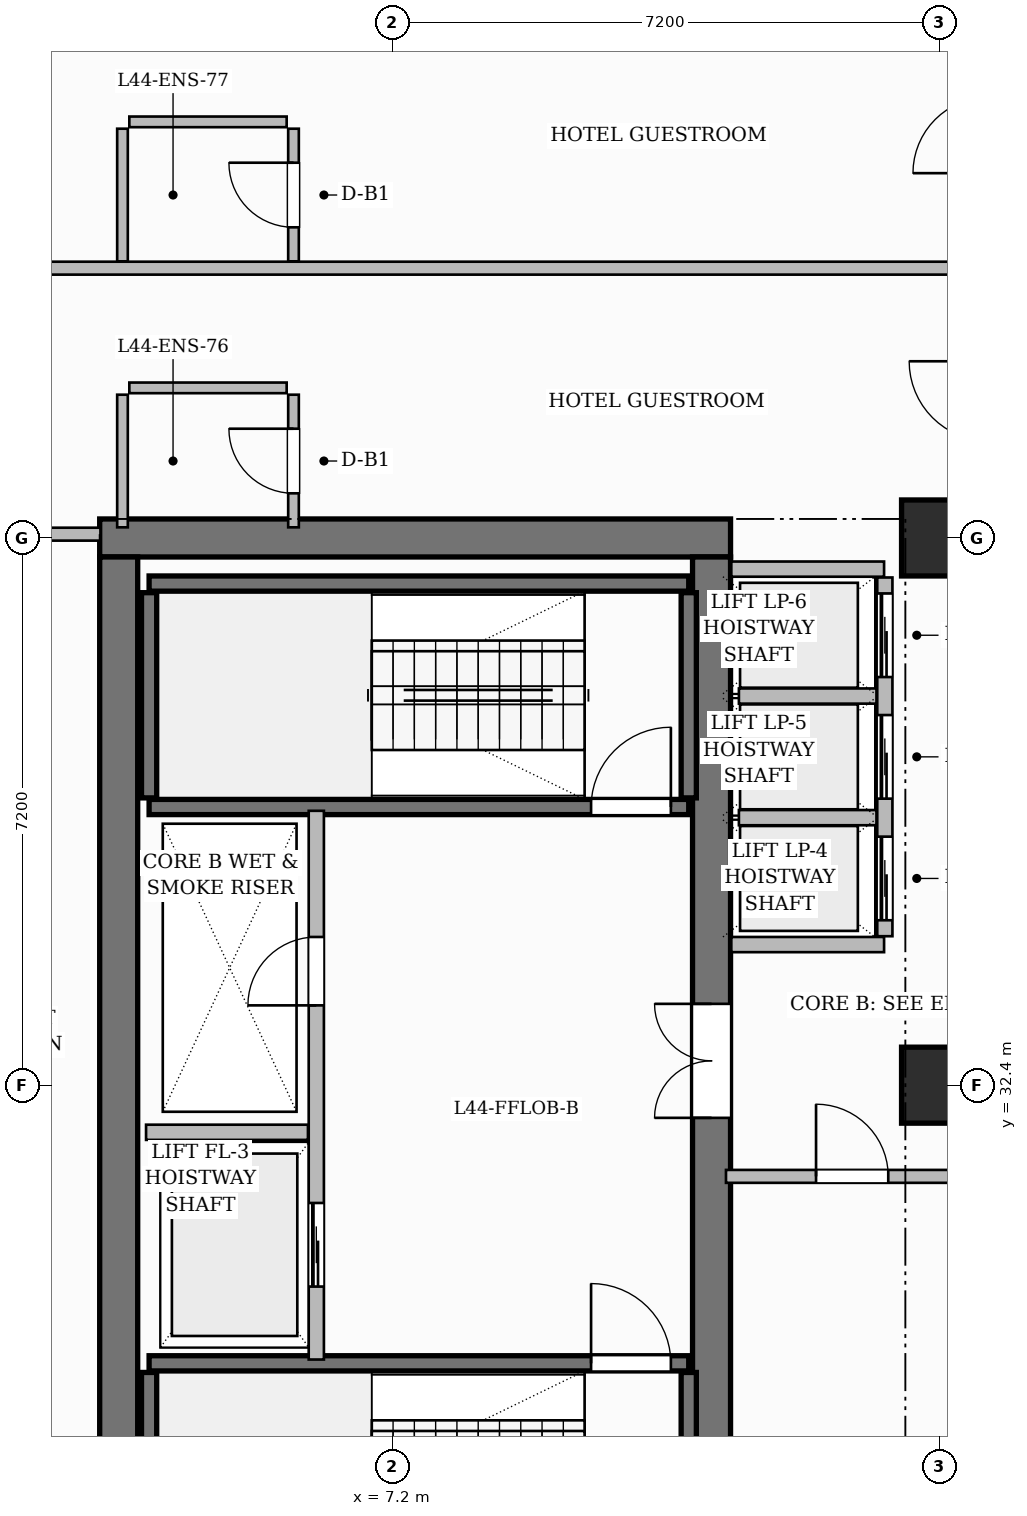
"""IFC4 building model, lengths in metres.
Left out: names, types, materials, properties, quantities, classifications, styles, units other than length and angle.
Written with IfcOpenShell. Run it as: python <this file> out.ifc"""

import sys

from ifc_helpers import new_model, si_unit, direction, frame, frame_2d, origin, origin_2d, place, context, subcontext, project, spatial, rectangle, extrude, source, transform, mapped, element, fill, save


model = new_model("IFC4")
c1 = context("Model", 3, precision=1e-05, world=origin(), true_north=direction((0.0, 1.0)))
c2 = subcontext(c1, "Body", "Model", "MODEL_VIEW")
j1 = project(units=[si_unit("LENGTHUNIT", "METRE"), si_unit("PLANEANGLEUNIT", "RADIAN")], contexts=[c1])
p1 = place(None, origin())
s1 = spatial("IfcSite", under=j1, at=p1, CompositionType="ELEMENT")
p2 = place(p1, origin())
s2 = spatial("IfcBuilding", under=s1, at=p2, CompositionType="ELEMENT")
p3 = place(p2, frame((0.0, 0.0, 177.25)))
s3 = spatial("IfcBuildingStorey", under=s2, at=p3, CompositionType="ELEMENT", Elevation=177.25)
p4 = place(p3, frame((3.35, 39.6, 0.0), z_axis=(0.0, 0.0, 1.0), x_axis=(1.0, 0.0, 0.0)))
e1 = element("IfcWall", 1, at=p4, inside=s3, PredefinedType="SHEAR", context=c2, shape_type="SweptSolid", body=[
    extrude(rectangle(XDim=8.3, YDim=0.5, at=frame_2d((4.15, 0.0))), origin(), (0.0, 0.0, 1.0), 3.85),
])
p5 = place(p3, frame((3.6, 25.45, 0.0), z_axis=(0.0, 0.0, 1.0), x_axis=(0.0, 1.0, 0.0)))
e2 = element("IfcWall", 2, at=p5, inside=s3, PredefinedType="SHEAR", context=c2, shape_type="SweptSolid", body=[
    extrude(rectangle(XDim=13.9, YDim=0.5, at=frame_2d((6.95, 0.0))), origin(), (0.0, 0.0, 1.0), 3.85),
])
p6 = place(p3, frame((11.4, 25.45, 0.0), z_axis=(0.0, 0.0, 1.0), x_axis=(0.0, 1.0, 0.0)))
e3 = element("IfcWall", 3, at=p6, inside=s3, PredefinedType="SHEAR", context=c2, shape_type="SweptSolid", body=[
    extrude(rectangle(XDim=13.9, YDim=0.5, at=frame_2d((6.95, 0.0))), origin(), (0.0, 0.0, 1.0), 3.85),
])
p7 = place(p6, frame((6.52, 0.0, 0.0)))
e4 = element("IfcOpeningElement", 4, at=p7, cuts=e3, PredefinedType="OPENING", context=c2, shape_type="SweptSolid", body=[
    extrude(rectangle(XDim=1.5, YDim=2.2, at=frame_2d((0.75, 1.1))), frame((0.0, 0.26, 0.0), z_axis=(0.0, -1.0, 0.0), x_axis=(1.0, 0.0, 0.0)), (0.0, 0.0, 1.0), 0.52),
])
m1 = source(origin(), c2, "Body", "SweptSolid", [
    extrude(rectangle(XDim=1.0, YDim=1.0, at=origin_2d()), origin(), (0.0, 0.0, 1.0), 3.85),
])
for number, where, z_axis, x_axis in (
    (5, (14.4, 32.4, 0.0), (0.0, 0.0, 1.0), (1.0, 0.0, 0.0)),
    (6, (14.4, 39.6, 0.0), (0.0, 0.0, 1.0), (1.0, 0.0, 0.0)),
):
    element("IfcColumn", number, at=place(p3, frame(where, z_axis=z_axis, x_axis=x_axis)), inside=s3, PredefinedType="COLUMN", context=c2, shape_type="MappedRepresentation", body=[
        mapped(m1, transform((0.0, 0.0, 0.0), scale=1.0)),
    ])
for number, where, z_axis, x_axis in (
    (7, (4.0, 25.92, 0.0), (0.0, 0.0, 1.0), (0.0, 1.0, 0.0)),
    (8, (11.1, 25.92, 0.0), (0.0, 0.0, 1.0), (0.0, 1.0, 0.0)),
):
    element("IfcWall", number, at=place(p3, frame(where, z_axis=z_axis, x_axis=x_axis)), inside=s3, PredefinedType="SHEAR", context=c2, shape_type="SweptSolid", body=[
        extrude(rectangle(XDim=2.7, YDim=0.2, at=frame_2d((1.35, 0.0))), origin(), (0.0, 0.0, 1.0), 3.85),
    ])
p8 = place(p3, frame((4.0, 28.74, 0.0), z_axis=(0.0, 0.0, 1.0), x_axis=(1.0, 0.0, 0.0)))
e9 = element("IfcWall", 9, at=p8, inside=s3, PredefinedType="SHEAR", context=c2, shape_type="SweptSolid", body=[
    extrude(rectangle(XDim=7.1, YDim=0.2, at=frame_2d((3.55, 0.0))), origin(), (0.0, 0.0, 1.0), 3.85),
])
p9 = place(p8, frame((5.815, 0.0, 0.0)))
e10 = element("IfcOpeningElement", 10, at=p9, cuts=e9, PredefinedType="OPENING", context=c2, shape_type="SweptSolid", body=[
    extrude(rectangle(XDim=1.05, YDim=2.2, at=frame_2d((0.525, 1.1))), frame((0.0, 0.11, 0.0), z_axis=(0.0, -1.0, 0.0), x_axis=(1.0, 0.0, 0.0)), (0.0, 0.0, 1.0), 0.22),
])
p10 = place(p3, frame((4.0, 39.0, 0.0), z_axis=(0.0, 0.0, 1.0), x_axis=(1.0, 0.0, 0.0)))
e11 = element("IfcWall", 11, at=p10, inside=s3, PredefinedType="SHEAR", context=c2, shape_type="SweptSolid", body=[
    extrude(rectangle(XDim=7.1, YDim=0.2, at=frame_2d((3.55, 0.0))), origin(), (0.0, 0.0, 1.0), 3.85),
])
for number, where, z_axis, x_axis in (
    (12, (4.0, 36.18, 0.0), (0.0, 0.0, 1.0), (0.0, 1.0, 0.0)),
    (13, (11.1, 36.18, 0.0), (0.0, 0.0, 1.0), (0.0, 1.0, 0.0)),
):
    element("IfcWall", number, at=place(p3, frame(where, z_axis=z_axis, x_axis=x_axis)), inside=s3, PredefinedType="SHEAR", context=c2, shape_type="SweptSolid", body=[
        extrude(rectangle(XDim=2.7, YDim=0.2, at=frame_2d((1.35, 0.0))), origin(), (0.0, 0.0, 1.0), 3.85),
    ])
p11 = place(p3, frame((4.0, 36.06, 0.0), z_axis=(0.0, 0.0, 1.0), x_axis=(1.0, 0.0, 0.0)))
e14 = element("IfcWall", 14, at=p11, inside=s3, PredefinedType="SHEAR", context=c2, shape_type="SweptSolid", body=[
    extrude(rectangle(XDim=7.1, YDim=0.2, at=frame_2d((3.55, 0.0))), origin(), (0.0, 0.0, 1.0), 3.85),
])
p12 = place(p11, frame((5.815, 0.0, 0.0)))
e15 = element("IfcOpeningElement", 15, at=p12, cuts=e14, PredefinedType="OPENING", context=c2, shape_type="SweptSolid", body=[
    extrude(rectangle(XDim=1.05, YDim=2.2, at=frame_2d((0.525, 1.1))), frame((0.0, 0.11, 0.0), z_axis=(0.0, -1.0, 0.0), x_axis=(1.0, 0.0, 0.0)), (0.0, 0.0, 1.0), 0.22),
])
p13 = place(p3, frame((6.2, 28.79, 0.0), z_axis=(0.0, 0.0, 1.0), x_axis=(0.0, 1.0, 0.0)))
e16 = element("IfcWall", 16, at=p13, inside=s3, PredefinedType="PARTITIONING", context=c2, shape_type="SweptSolid", body=[
    extrude(rectangle(XDim=7.22, YDim=0.2, at=frame_2d((3.61, 0.0))), origin(), (0.0, 0.0, 1.0), 3.6),
])
p14 = place(p13, frame((4.66, 0.0, 0.0)))
e17 = element("IfcOpeningElement", 17, at=p14, cuts=e16, PredefinedType="OPENING", context=c2, shape_type="SweptSolid", body=[
    extrude(rectangle(XDim=0.9, YDim=2.1, at=frame_2d((0.45, 1.05))), frame((0.0, 0.11, 0.0), z_axis=(0.0, -1.0, 0.0), x_axis=(1.0, 0.0, 0.0)), (0.0, 0.0, 1.0), 0.22),
])
p15 = place(p13, frame((0.96, 0.0, 0.0)))
e18 = element("IfcOpeningElement", 18, at=p15, cuts=e16, PredefinedType="OPENING", context=c2, shape_type="SweptSolid", body=[
    extrude(rectangle(XDim=1.1, YDim=2.2, at=frame_2d((0.55, 1.1))), frame((0.0, 0.11, 0.0), z_axis=(0.0, -1.0, 0.0), x_axis=(1.0, 0.0, 0.0)), (0.0, 0.0, 1.0), 0.22),
])
p16 = place(p3, frame((3.96, 31.78, 0.0), z_axis=(0.0, 0.0, 1.0), x_axis=(1.0, 0.0, 0.0)))
e19 = element("IfcWall", 19, at=p16, inside=s3, PredefinedType="PARTITIONING", context=c2, shape_type="SweptSolid", body=[
    extrude(rectangle(XDim=2.13, YDim=0.2, at=frame_2d((1.065, 0.0))), origin(), (0.0, 0.0, 1.0), 3.6),
])
for number, where, z_axis, x_axis in (
    (20, (11.66, 34.25, 0.0), (0.0, 0.0, 1.0), (1.0, 0.0, 0.0)),
    (21, (11.66, 39.19, 0.0), (0.0, 0.0, 1.0), (1.0, 0.0, 0.0)),
):
    element("IfcWall", number, at=place(p3, frame(where, z_axis=z_axis, x_axis=x_axis)), inside=s3, PredefinedType="PARTITIONING", context=c2, shape_type="SweptSolid", body=[
        extrude(rectangle(XDim=2.01, YDim=0.2, at=frame_2d((1.005, 0.0))), origin(), (0.0, 0.0, 1.0), 3.6),
    ])
p17 = place(p3, frame((13.68, 34.36, 0.0), z_axis=(0.0, 0.0, 1.0), x_axis=(0.0, 1.0, 0.0)))
e22 = element("IfcWall", 22, at=p17, inside=s3, PredefinedType="PARTITIONING", context=c2, shape_type="SweptSolid", body=[
    extrude(rectangle(XDim=4.72, YDim=0.2, at=frame_2d((2.36, 0.0))), origin(), (0.0, 0.0, 1.0), 3.6),
])
p18 = place(p17, frame((0.21, 0.0, 0.0)))
e23 = element("IfcOpeningElement", 23, at=p18, cuts=e22, PredefinedType="OPENING", context=c2, shape_type="SweptSolid", body=[
    extrude(rectangle(XDim=1.1, YDim=2.2, at=frame_2d((0.55, 1.1))), frame((0.0, 0.11, 0.0), z_axis=(0.0, -1.0, 0.0), x_axis=(1.0, 0.0, 0.0)), (0.0, 0.0, 1.0), 0.22),
])
p19 = place(p17, frame((1.81, 0.0, 0.0)))
e24 = element("IfcOpeningElement", 24, at=p19, cuts=e22, PredefinedType="OPENING", context=c2, shape_type="SweptSolid", body=[
    extrude(rectangle(XDim=1.1, YDim=2.2, at=frame_2d((0.55, 1.1))), frame((0.0, 0.11, 0.0), z_axis=(0.0, -1.0, 0.0), x_axis=(1.0, 0.0, 0.0)), (0.0, 0.0, 1.0), 0.22),
])
p20 = place(p17, frame((3.41, 0.0, 0.0)))
e25 = element("IfcOpeningElement", 25, at=p20, cuts=e22, PredefinedType="OPENING", context=c2, shape_type="SweptSolid", body=[
    extrude(rectangle(XDim=1.1, YDim=2.2, at=frame_2d((0.55, 1.1))), frame((0.0, 0.11, 0.0), z_axis=(0.0, -1.0, 0.0), x_axis=(1.0, 0.0, 0.0)), (0.0, 0.0, 1.0), 0.22),
])
for number, where, z_axis, x_axis in (
    (26, (11.76, 35.92, 0.0), (0.0, 0.0, 1.0), (1.0, 0.0, 0.0)),
    (27, (11.76, 37.52, 0.0), (0.0, 0.0, 1.0), (1.0, 0.0, 0.0)),
):
    element("IfcWall", number, at=place(p3, frame(where, z_axis=z_axis, x_axis=x_axis)), inside=s3, PredefinedType="PARTITIONING", context=c2, shape_type="SweptSolid", body=[
        extrude(rectangle(XDim=1.81, YDim=0.2, at=frame_2d((0.905, 0.0))), origin(), (0.0, 0.0, 1.0), 3.6),
    ])
p21 = place(p3, frame((0.24, 39.65, 0.0), z_axis=(0.0, 0.0, 1.0), x_axis=(1.0, 0.0, 0.0)))
e28 = element("IfcWall", 28, at=p21, inside=s3, PredefinedType="PARTITIONING", context=c2, shape_type="SweptSolid", body=[
    extrude(rectangle(XDim=3.12, YDim=0.17, at=frame_2d((1.56, 0.0))), origin(), (0.0, 0.0, 1.0), 3.6),
])
p22 = place(p21, frame((1.11, 0.0, 0.0)))
e29 = element("IfcOpeningElement", 29, at=p22, cuts=e28, PredefinedType="OPENING", context=c2, shape_type="SweptSolid", body=[
    extrude(rectangle(XDim=0.9, YDim=2.15, at=frame_2d((0.45, 1.075))), frame((0.0, 0.095, 0.0), z_axis=(0.0, -1.0, 0.0), x_axis=(1.0, 0.0, 0.0)), (0.0, 0.0, 1.0), 0.19),
])
p23 = place(p3, frame((0.168, 43.15, 0.0), z_axis=(0.0, 0.0, 1.0), x_axis=(1.0, 0.0, 0.0)))
e30 = element("IfcWall", 30, at=p23, inside=s3, PredefinedType="PARTITIONING", context=c2, shape_type="SweptSolid", body=[
    extrude(rectangle(XDim=14.792, YDim=0.17, at=frame_2d((7.396, 0.0))), origin(), (0.0, 0.0, 1.0), 3.6),
])
p24 = place(p3, frame((3.65, 39.74, 0.0), z_axis=(0.0, 0.0, 1.0), x_axis=(0.0, 1.0, 0.0)))
e31 = element("IfcWall", 31, at=p24, inside=s3, PredefinedType="PARTITIONING", context=c2, shape_type="SweptSolid", body=[
    extrude(rectangle(XDim=1.745, YDim=0.14, at=frame_2d((0.873, 0.0))), origin(), (0.0, 0.0, 1.0), 3.6),
])
p25 = place(p3, frame((3.74, 41.575, 0.0), z_axis=(0.0, 0.0, 1.0), x_axis=(1.0, 0.0, 0.0)))
e32 = element("IfcWall", 32, at=p25, inside=s3, PredefinedType="PARTITIONING", context=c2, shape_type="SweptSolid", body=[
    extrude(rectangle(XDim=2.07, YDim=0.14, at=frame_2d((1.035, 0.0))), origin(), (0.0, 0.0, 1.0), 3.085),
])
p26 = place(p3, frame((5.9, 39.74, 0.0), z_axis=(0.0, 0.0, 1.0), x_axis=(0.0, 1.0, 0.0)))
e33 = element("IfcWall", 33, at=p26, inside=s3, PredefinedType="PARTITIONING", context=c2, shape_type="SweptSolid", body=[
    extrude(rectangle(XDim=1.745, YDim=0.14, at=frame_2d((0.873, 0.0))), origin(), (0.0, 0.0, 1.0), 3.6),
])
p27 = place(p26, frame((0.448, 0.0, 0.0)))
e34 = element("IfcOpeningElement", 34, at=p27, cuts=e33, PredefinedType="OPENING", context=c2, shape_type="SweptSolid", body=[
    extrude(rectangle(XDim=0.85, YDim=2.1, at=frame_2d((0.425, 1.05))), frame((0.0, 0.08, 0.0), z_axis=(0.0, -1.0, 0.0), x_axis=(1.0, 0.0, 0.0)), (0.0, 0.0, 1.0), 0.16),
])
p28 = place(p3, frame((3.65, 43.24, 0.0), z_axis=(0.0, 0.0, 1.0), x_axis=(0.0, 1.0, 0.0)))
e35 = element("IfcWall", 35, at=p28, inside=s3, PredefinedType="PARTITIONING", context=c2, shape_type="SweptSolid", body=[
    extrude(rectangle(XDim=1.745, YDim=0.14, at=frame_2d((0.873, 0.0))), origin(), (0.0, 0.0, 1.0), 3.6),
])
p29 = place(p3, frame((3.74, 45.075, 0.0), z_axis=(0.0, 0.0, 1.0), x_axis=(1.0, 0.0, 0.0)))
e36 = element("IfcWall", 36, at=p29, inside=s3, PredefinedType="PARTITIONING", context=c2, shape_type="SweptSolid", body=[
    extrude(rectangle(XDim=2.07, YDim=0.14, at=frame_2d((1.035, 0.0))), origin(), (0.0, 0.0, 1.0), 3.6),
])
p30 = place(p3, frame((5.9, 43.24, 0.0), z_axis=(0.0, 0.0, 1.0), x_axis=(0.0, 1.0, 0.0)))
e37 = element("IfcWall", 37, at=p30, inside=s3, PredefinedType="PARTITIONING", context=c2, shape_type="SweptSolid", body=[
    extrude(rectangle(XDim=1.745, YDim=0.14, at=frame_2d((0.873, 0.0))), origin(), (0.0, 0.0, 1.0), 3.6),
])
p31 = place(p30, frame((0.448, 0.0, 0.0)))
e38 = element("IfcOpeningElement", 38, at=p31, cuts=e37, PredefinedType="OPENING", context=c2, shape_type="SweptSolid", body=[
    extrude(rectangle(XDim=0.85, YDim=2.1, at=frame_2d((0.425, 1.05))), frame((0.0, 0.08, 0.0), z_axis=(0.0, -1.0, 0.0), x_axis=(1.0, 0.0, 0.0)), (0.0, 0.0, 1.0), 0.16),
])
p32 = place(p3, frame((11.59, 31.2, 0.0), z_axis=(0.0, 0.0, 1.0), x_axis=(1.0, 0.0, 0.0)))
e39 = element("IfcWall", 39, at=p32, inside=s3, PredefinedType="PARTITIONING", context=c2, shape_type="SweptSolid", body=[
    extrude(rectangle(XDim=3.37, YDim=0.17, at=frame_2d((1.685, 0.0))), origin(), (0.0, 0.0, 1.0), 3.6),
])
p33 = place(p32, frame((1.185, 0.0, 0.0)))
e40 = element("IfcOpeningElement", 40, at=p33, cuts=e39, PredefinedType="OPENING", context=c2, shape_type="SweptSolid", body=[
    extrude(rectangle(XDim=0.95, YDim=2.15, at=frame_2d((0.475, 1.075))), frame((0.0, 0.095, 0.0), z_axis=(0.0, -1.0, 0.0), x_axis=(1.0, 0.0, 0.0)), (0.0, 0.0, 1.0), 0.19),
])
m2 = source(origin(), c2, "Body", "SweptSolid", [
    extrude(rectangle(XDim=1.05, YDim=2.2, at=frame_2d((0.525, 1.1))), frame((0.0, 0.025, 0.0), z_axis=(0.0, -1.0, 0.0), x_axis=(1.0, 0.0, 0.0)), (0.0, 0.0, 1.0), 0.05),
])
p34 = place(p9, origin())
e41 = element("IfcDoor", 41, at=p34, inside=s3, OperationType="SINGLE_SWING_LEFT", PredefinedType="DOOR", context=c2, shape_type="MappedRepresentation", body=[
    mapped(m2, transform((0.0, 0.0, 0.0), scale=1.0)),
])
fill(e10, e41)
p35 = place(p12, origin())
e42 = element("IfcDoor", 42, at=p35, inside=s3, OperationType="SINGLE_SWING_RIGHT", PredefinedType="DOOR", context=c2, shape_type="MappedRepresentation", body=[
    mapped(m2, transform((0.0, 0.0, 0.0), scale=1.0)),
])
fill(e15, e42)
m3 = source(origin(), c2, "Body", "SweptSolid", [
    extrude(rectangle(XDim=0.9, YDim=2.1, at=frame_2d((0.45, 1.05))), frame((0.0, 0.025, 0.0), z_axis=(0.0, -1.0, 0.0), x_axis=(1.0, 0.0, 0.0)), (0.0, 0.0, 1.0), 0.05),
])
p36 = place(p14, origin())
e43 = element("IfcDoor", 43, at=p36, inside=s3, OperationType="SINGLE_SWING_LEFT", PredefinedType="DOOR", context=c2, shape_type="MappedRepresentation", body=[
    mapped(m3, transform((0.0, 0.0, 0.0), scale=1.0)),
])
fill(e17, e43)
m4 = source(origin(), c2, "Body", "SweptSolid", [
    extrude(rectangle(XDim=1.5, YDim=2.2, at=frame_2d((0.75, 1.1))), frame((0.0, 0.025, 0.0), z_axis=(0.0, -1.0, 0.0), x_axis=(1.0, 0.0, 0.0)), (0.0, 0.0, 1.0), 0.05),
])
p37 = place(p7, origin())
e44 = element("IfcDoor", 44, at=p37, inside=s3, OperationType="DOUBLE_DOOR_SINGLE_SWING", PredefinedType="DOOR", context=c2, shape_type="MappedRepresentation", body=[
    mapped(m4, transform((0.0, 0.0, 0.0), scale=1.0)),
])
fill(e4, e44)
m5 = source(origin(), c2, "Body", "SweptSolid", [
    extrude(rectangle(XDim=0.85, YDim=2.1, at=frame_2d((0.425, 1.05))), frame((0.0, 0.025, 0.0), z_axis=(0.0, -1.0, 0.0), x_axis=(1.0, 0.0, 0.0)), (0.0, 0.0, 1.0), 0.05),
])
p38 = place(p27, origin())
e45 = element("IfcDoor", 45, at=p38, inside=s3, OperationType="SINGLE_SWING_RIGHT", PredefinedType="DOOR", context=c2, shape_type="MappedRepresentation", body=[
    mapped(m5, transform((0.0, 0.0, 0.0), scale=1.0)),
])
fill(e34, e45)
p39 = place(p31, origin())
e46 = element("IfcDoor", 46, at=p39, inside=s3, OperationType="SINGLE_SWING_RIGHT", PredefinedType="DOOR", context=c2, shape_type="MappedRepresentation", body=[
    mapped(m5, transform((0.0, 0.0, 0.0), scale=1.0)),
])
fill(e38, e46)
m6 = source(origin(), c2, "Body", "SweptSolid", [
    extrude(rectangle(XDim=0.95, YDim=2.15, at=frame_2d((0.475, 1.075))), frame((0.0, 0.025, 0.0), z_axis=(0.0, -1.0, 0.0), x_axis=(1.0, 0.0, 0.0)), (0.0, 0.0, 1.0), 0.05),
])
p40 = place(p33, origin())
e47 = element("IfcDoor", 47, at=p40, inside=s3, OperationType="SINGLE_SWING_LEFT", PredefinedType="DOOR", context=c2, shape_type="MappedRepresentation", body=[
    mapped(m6, transform((0.0, 0.0, 0.0), scale=1.0)),
])
fill(e40, e47)
m7 = source(origin(), c2, "Body", "SweptSolid", [
    extrude(rectangle(XDim=1.1, YDim=2.2, at=frame_2d((0.55, 1.1))), frame((0.0, 0.025, 0.0), z_axis=(0.0, -1.0, 0.0), x_axis=(1.0, 0.0, 0.0)), (0.0, 0.0, 1.0), 0.05),
])
p41 = place(p15, origin())
e48 = element("IfcDoor", 48, at=p41, inside=s3, OperationType="SLIDING_TO_LEFT", PredefinedType="DOOR", context=c2, shape_type="MappedRepresentation", body=[
    mapped(m7, transform((0.0, 0.0, 0.0), scale=1.0)),
])
fill(e18, e48)
p42 = place(p18, origin())
e49 = element("IfcDoor", 49, at=p42, inside=s3, OperationType="SLIDING_TO_LEFT", PredefinedType="DOOR", context=c2, shape_type="MappedRepresentation", body=[
    mapped(m7, transform((0.0, 0.0, 0.0), scale=1.0)),
])
fill(e23, e49)
p43 = place(p19, origin())
e50 = element("IfcDoor", 50, at=p43, inside=s3, OperationType="SLIDING_TO_LEFT", PredefinedType="DOOR", context=c2, shape_type="MappedRepresentation", body=[
    mapped(m7, transform((0.0, 0.0, 0.0), scale=1.0)),
])
fill(e24, e50)
p44 = place(p20, origin())
e51 = element("IfcDoor", 51, at=p44, inside=s3, OperationType="SLIDING_TO_LEFT", PredefinedType="DOOR", context=c2, shape_type="MappedRepresentation", body=[
    mapped(m7, transform((0.0, 0.0, 0.0), scale=1.0)),
])
fill(e25, e51)
save(model, sys.argv[1])
